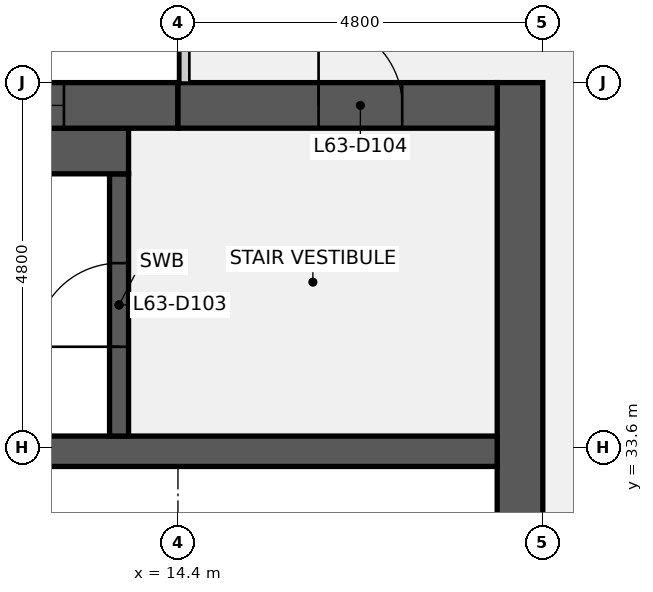
"""IFC4 building model, lengths in metres.
Left out: names, types, materials, properties, quantities, classifications, styles, units other than length and angle.
Written with IfcOpenShell. Run it as: python <this file> out.ifc"""

import sys

from ifc_helpers import new_model, si_unit, direction, frame, frame_2d, origin, place, context, subcontext, project, spatial, rectangle, extrude, element, fill, save


model = new_model("IFC4")
c1 = context("Model", 3, precision=1e-05, world=origin(), true_north=direction((0.0, 1.0)))
c2 = subcontext(c1, "Body", "Model", "MODEL_VIEW")
j1 = project(units=[si_unit("LENGTHUNIT", "METRE"), si_unit("PLANEANGLEUNIT", "RADIAN")], contexts=[c1])
p1 = place(None, origin())
s1 = spatial("IfcSite", under=j1, at=p1, CompositionType="ELEMENT")
p2 = place(p1, origin())
s2 = spatial("IfcBuilding", under=s1, at=p2, CompositionType="ELEMENT")
p3 = place(p2, frame((0.0, 0.0, 290.3)))
s3 = spatial("IfcBuildingStorey", under=s2, at=p3, CompositionType="ELEMENT", Elevation=290.3)
p4 = place(p3, frame((18.9, 38.4, 0.0), z_axis=(0.0, 0.0, 1.0), x_axis=(0.0, -1.0, 0.0)))
e1 = element("IfcWall", 1, at=p4, inside=s3, PredefinedType="SHEAR", context=c2, shape_type="SweptSolid", body=[
    extrude(rectangle(XDim=28.8, YDim=0.6, at=frame_2d((14.4, 0.0))), origin(), (0.0, 0.0, 1.0), 3.84),
])
p5 = place(p4, frame((18.3, 0.0, 0.0)))
e2 = element("IfcOpeningElement", 2, at=p5, cuts=e1, PredefinedType="OPENING", context=c2, shape_type="SweptSolid", body=[
    extrude(rectangle(XDim=1.8, YDim=2.1, at=frame_2d((0.9, 1.05))), frame((0.0, 0.31, 0.0), z_axis=(0.0, -1.0, 0.0), x_axis=(1.0, 0.0, 0.0)), (0.0, 0.0, 1.0), 0.62),
])
p6 = place(p4, frame((8.7, 0.0, 0.0)))
e3 = element("IfcOpeningElement", 3, at=p6, cuts=e1, PredefinedType="OPENING", context=c2, shape_type="SweptSolid", body=[
    extrude(rectangle(XDim=1.8, YDim=2.1, at=frame_2d((0.9, 1.05))), frame((0.0, 0.31, 0.0), z_axis=(0.0, -1.0, 0.0), x_axis=(1.0, 0.0, 0.0)), (0.0, 0.0, 1.0), 0.62),
])
p7 = place(p3, frame((0.6, 33.55, 0.0), z_axis=(0.0, 0.0, 1.0), x_axis=(1.0, 0.0, 0.0)))
e4 = element("IfcWall", 4, at=p7, inside=s3, PredefinedType="SHEAR", context=c2, shape_type="SweptSolid", body=[
    extrude(rectangle(XDim=18.0, YDim=0.4, at=frame_2d((9.0, 0.0))), origin(), (0.0, 0.0, 1.0), 3.84),
])
p8 = place(p3, frame((13.625, 33.75, 0.0), z_axis=(0.0, 0.0, 1.0), x_axis=(0.0, 1.0, 0.0)))
e5 = element("IfcWall", 5, at=p8, inside=s3, PredefinedType="SHEAR", context=c2, shape_type="SweptSolid", body=[
    extrude(rectangle(XDim=3.45, YDim=0.25, at=frame_2d((1.725, 0.0))), origin(), (0.0, 0.0, 1.0), 3.84),
])
p9 = place(p8, frame((1.175, 0.0, 0.0)))
e6 = element("IfcOpeningElement", 6, at=p9, cuts=e5, PredefinedType="OPENING", context=c2, shape_type="SweptSolid", body=[
    extrude(rectangle(XDim=1.1, YDim=2.1, at=frame_2d((0.55, 1.05))), frame((0.0, 0.135, 0.0), z_axis=(0.0, -1.0, 0.0), x_axis=(1.0, 0.0, 0.0)), (0.0, 0.0, 1.0), 0.27),
])
p10 = place(p3, frame((6.25, 37.5, 0.0), z_axis=(0.0, 0.0, 1.0), x_axis=(1.0, 0.0, 0.0)))
e7 = element("IfcWall", 7, at=p10, inside=s3, PredefinedType="SHEAR", context=c2, shape_type="SweptSolid", body=[
    extrude(rectangle(XDim=7.5, YDim=0.6, at=frame_2d((3.75, 0.0))), origin(), (0.0, 0.0, 1.0), 3.84),
])
p11 = place(p3, frame((0.6, 38.1, 0.0), z_axis=(0.0, 0.0, 1.0), x_axis=(1.0, 0.0, 0.0)))
e8 = element("IfcWall", 8, at=p11, inside=s3, PredefinedType="SHEAR", context=c2, shape_type="SweptSolid", body=[
    extrude(rectangle(XDim=13.8, YDim=0.6, at=frame_2d((6.9, 0.0))), origin(), (0.0, 0.0, 1.0), 3.84),
])
p12 = place(p11, frame((5.7, 0.0, 0.9)))
e9 = element("IfcOpeningElement", 9, at=p12, cuts=e8, PredefinedType="OPENING", context=c2, shape_type="SweptSolid", body=[
    extrude(rectangle(XDim=1.8, YDim=1.5, at=frame_2d((0.9, 0.75))), frame((0.0, 0.31, 0.0), z_axis=(0.0, -1.0, 0.0), x_axis=(1.0, 0.0, 0.0)), (0.0, 0.0, 1.0), 0.62),
])
p13 = place(p11, frame((10.5, 0.0, 0.9)))
e10 = element("IfcOpeningElement", 10, at=p13, cuts=e8, PredefinedType="OPENING", context=c2, shape_type="SweptSolid", body=[
    extrude(rectangle(XDim=1.8, YDim=1.5, at=frame_2d((0.9, 0.75))), frame((0.0, 0.31, 0.0), z_axis=(0.0, -1.0, 0.0), x_axis=(1.0, 0.0, 0.0)), (0.0, 0.0, 1.0), 0.62),
])
p14 = place(p3, frame((14.4, 38.1, 0.0), z_axis=(0.0, 0.0, 1.0), x_axis=(1.0, 0.0, 0.0)))
e11 = element("IfcWall", 11, at=p14, inside=s3, PredefinedType="SHEAR", context=c2, shape_type="SweptSolid", body=[
    extrude(rectangle(XDim=4.2, YDim=0.6, at=frame_2d((2.1, 0.0))), origin(), (0.0, 0.0, 1.0), 3.84),
])
p15 = place(p14, frame((1.85, 0.0, 0.0)))
e12 = element("IfcOpeningElement", 12, at=p15, cuts=e11, PredefinedType="OPENING", context=c2, shape_type="SweptSolid", body=[
    extrude(rectangle(XDim=1.1, YDim=2.1, at=frame_2d((0.55, 1.05))), frame((0.0, 0.31, 0.0), z_axis=(0.0, -1.0, 0.0), x_axis=(1.0, 0.0, 0.0)), (0.0, 0.0, 1.0), 0.62),
])
p16 = place(p9, origin())
e13 = element("IfcDoor", 13, at=p16, inside=s3, OperationType="SINGLE_SWING_LEFT", PredefinedType="DOOR", context=c2, shape_type="SweptSolid", body=[
    extrude(rectangle(XDim=1.1, YDim=2.1, at=frame_2d((0.55, 1.05))), frame((0.0, 0.025, 0.0), z_axis=(0.0, -1.0, 0.0), x_axis=(1.0, 0.0, 0.0)), (0.0, 0.0, 1.0), 0.05),
])
fill(e6, e13)
p17 = place(p15, origin())
e14 = element("IfcDoor", 14, at=p17, inside=s3, OperationType="SINGLE_SWING_LEFT", PredefinedType="DOOR", context=c2, shape_type="SweptSolid", body=[
    extrude(rectangle(XDim=1.1, YDim=2.1, at=frame_2d((0.55, 1.05))), frame((0.0, 0.025, 0.0), z_axis=(0.0, -1.0, 0.0), x_axis=(1.0, 0.0, 0.0)), (0.0, 0.0, 1.0), 0.05),
])
fill(e12, e14)
p18 = place(p13, origin())
e15 = element("IfcWindow", 15, at=p18, inside=s3, PartitioningType="SINGLE_PANEL", PredefinedType="WINDOW", context=c2, shape_type="SweptSolid", body=[
    extrude(rectangle(XDim=1.8, YDim=1.5, at=frame_2d((0.9, 0.75))), frame((0.0, 0.03, 0.0), z_axis=(0.0, -1.0, 0.0), x_axis=(1.0, 0.0, 0.0)), (0.0, 0.0, 1.0), 0.06),
])
fill(e10, e15)
save(model, sys.argv[1])
